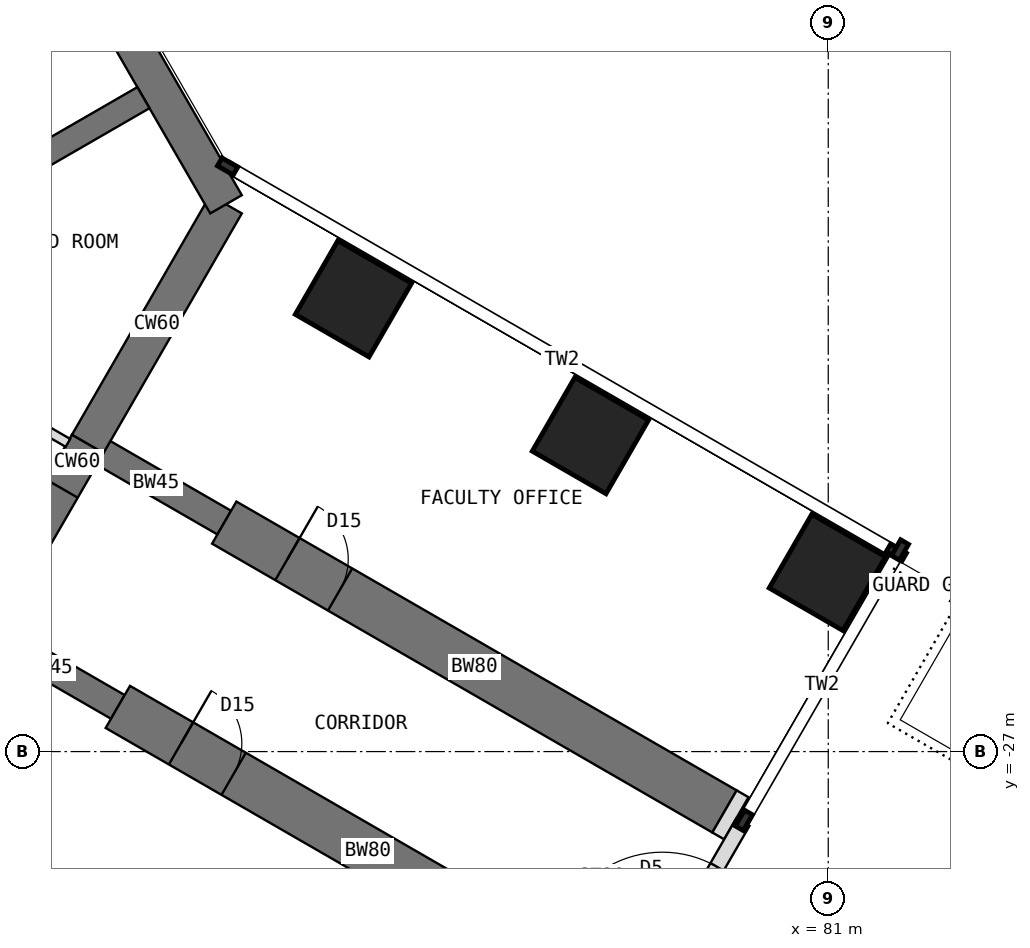
"""IFC4 building model, lengths in metres.
Left out: names, types, materials, properties, quantities, classifications, styles, units other than length and angle.
Written with IfcOpenShell. Run it as: python <this file> out.ifc"""

import sys

from ifc_helpers import new_model, si_unit, direction, frame, frame_2d, origin, origin_2d, place, context, subcontext, project, spatial, rectangle, extrude, element, fill, save


model = new_model("IFC4")
c1 = context("Model", 3, precision=1e-05, world=origin(), true_north=direction((0.0, 1.0)))
c2 = subcontext(c1, "Body", "Model", "MODEL_VIEW")
j1 = project(units=[si_unit("LENGTHUNIT", "METRE"), si_unit("PLANEANGLEUNIT", "RADIAN")], contexts=[c1])
p1 = place(None, origin())
s1 = spatial("IfcSite", under=j1, at=p1, CompositionType="ELEMENT")
p2 = place(p1, origin())
s2 = spatial("IfcBuilding", under=s1, at=p2, CompositionType="ELEMENT")
p3 = place(p2, frame((0.0, 0.0, 97.5)))
s3 = spatial("IfcBuildingStorey", under=s2, at=p3, CompositionType="ELEMENT", Elevation=97.5)
p4 = place(p3, frame((67.072, -24.97, 0.0), z_axis=(0.0, 0.0, 1.0), x_axis=(0.500010275428, 0.866019471182, 0.0)))
e1 = element("IfcWall", 1, at=p4, inside=s3, PredefinedType="SHEAR", context=c2, shape_type="SweptSolid", body=[
    extrude(rectangle(XDim=3.5, YDim=0.6, at=frame_2d((1.75, 0.0))), origin(), (0.0, 0.0, 1.0), 4.0),
])
p5 = place(p4, frame((0.85, 0.0, 0.0)))
e2 = element("IfcOpeningElement", 2, at=p5, cuts=e1, PredefinedType="OPENING", context=c2, shape_type="SweptSolid", body=[
    extrude(rectangle(XDim=1.8, YDim=2.1, at=frame_2d((0.9, 1.05))), frame((0.0, 0.31, 0.0), z_axis=(0.0, -1.0, 0.0), x_axis=(1.0, 0.0, 0.0)), (0.0, 0.0, 1.0), 0.62),
])
p6 = place(p3, frame((68.822, -21.939, 0.0), z_axis=(0.0, 0.0, 1.0), x_axis=(0.500024481964, 0.866011268655, 0.0)))
e3 = element("IfcWall", 3, at=p6, inside=s3, PredefinedType="SHEAR", context=c2, shape_type="SweptSolid", body=[
    extrude(rectangle(XDim=4.548, YDim=0.6, at=frame_2d((2.274, 0.0))), origin(), (0.0, 0.0, 1.0), 4.0),
])
p7 = place(p3, frame((71.096, -18.0, 0.0), z_axis=(0.0, 0.0, 1.0), x_axis=(-0.500005998175, 0.866021940709, 0.0)))
e4 = element("IfcWall", 4, at=p7, inside=s3, PredefinedType="SHEAR", context=c2, shape_type="SweptSolid", body=[
    extrude(rectangle(XDim=12.596, YDim=0.6, at=frame_2d((6.298, 0.0))), origin(), (0.0, 0.0, 1.0), 4.0),
])
p8 = place(p3, frame((68.822, -21.939, 0.0), z_axis=(0.0, 0.0, 1.0), x_axis=(0.866072649678, -0.499918158782, 0.0)))
e5 = element("IfcWall", 5, at=p8, inside=s3, PredefinedType="SHEAR", context=c2, shape_type="SweptSolid", body=[
    extrude(rectangle(XDim=2.592, YDim=0.45, at=frame_2d((1.296, 0.0))), origin(), (0.0, 0.0, 1.0), 4.0),
])
p9 = place(p3, frame((71.066, -23.234, 0.0), z_axis=(0.0, 0.0, 1.0), x_axis=(0.86602681393, -0.499997557548, 0.0)))
e6 = element("IfcWall", 6, at=p9, inside=s3, PredefinedType="SHEAR", context=c2, shape_type="SweptSolid", body=[
    extrude(rectangle(XDim=9.5, YDim=0.8, at=frame_2d((4.75, 0.0))), origin(), (0.0, 0.0, 1.0), 4.0),
])
p10 = place(p9, frame((1.2, 0.0, 0.0)))
e7 = element("IfcOpeningElement", 7, at=p10, cuts=e6, PredefinedType="OPENING", context=c2, shape_type="SweptSolid", body=[
    extrude(rectangle(XDim=1.0, YDim=2.1, at=frame_2d((0.5, 1.05))), frame((0.0, 0.41, 0.0), z_axis=(0.0, -1.0, 0.0), x_axis=(1.0, 0.0, 0.0)), (0.0, 0.0, 1.0), 0.82),
])
p11 = place(p3, frame((67.072, -24.97, 0.0), z_axis=(0.0, 0.0, 1.0), x_axis=(0.866031863473, -0.499988811324, 0.0)))
e8 = element("IfcWall", 8, at=p11, inside=s3, PredefinedType="SHEAR", context=c2, shape_type="SweptSolid", body=[
    extrude(rectangle(XDim=2.592, YDim=0.45, at=frame_2d((1.296, 0.0))), origin(), (0.0, 0.0, 1.0), 4.0),
])
p12 = place(p3, frame((69.316, -26.266, 0.0), z_axis=(0.0, 0.0, 1.0), x_axis=(0.86602681393, -0.499997557548, 0.0)))
e9 = element("IfcWall", 9, at=p12, inside=s3, PredefinedType="SHEAR", context=c2, shape_type="SweptSolid", body=[
    extrude(rectangle(XDim=9.5, YDim=0.8, at=frame_2d((4.75, 0.0))), origin(), (0.0, 0.0, 1.0), 4.0),
])
p13 = place(p12, frame((1.2, 0.0, 0.0)))
e10 = element("IfcOpeningElement", 10, at=p13, cuts=e9, PredefinedType="OPENING", context=c2, shape_type="SweptSolid", body=[
    extrude(rectangle(XDim=1.0, YDim=2.1, at=frame_2d((0.5, 1.05))), frame((0.0, 0.41, 0.0), z_axis=(0.0, -1.0, 0.0), x_axis=(1.0, 0.0, 0.0)), (0.0, 0.0, 1.0), 0.82),
])
for number, where, z_axis, x_axis in (
    (11, (73.191, -19.554, 0.0), (0.0, 0.0, 1.0), (0.5, 0.866, 0.0)),
    (12, (77.088, -21.804, 0.0), (0.0, 0.0, 1.0), (0.5, 0.866, 0.0)),
    (13, (80.986, -24.054, 0.0), (0.0, 0.0, 1.0), (0.5, 0.866, 0.0)),
):
    element("IfcColumn", number, at=place(p3, frame(where, z_axis=z_axis, x_axis=x_axis)), inside=s3, PredefinedType="COLUMN", context=c2, shape_type="SweptSolid", body=[
        extrude(rectangle(XDim=1.4, YDim=1.4, at=origin_2d()), origin(), (0.0, 0.0, 1.0), 4.0),
    ])
p14 = place(p3, frame((77.847, -31.19, 0.0), z_axis=(0.0, 0.0, 1.0), x_axis=(0.500010275428, 0.866019471182, 0.0)))
e14 = element("IfcWall", 14, at=p14, inside=s3, PredefinedType="STANDARD", context=c2, shape_type="SweptSolid", body=[
    extrude(rectangle(XDim=3.5, YDim=0.25, at=frame_2d((1.75, 0.0))), origin(), (0.0, 0.0, 1.0), 3.8),
])
p15 = place(p14, frame((0.85, 0.0, 0.0)))
e15 = element("IfcOpeningElement", 15, at=p15, cuts=e14, PredefinedType="OPENING", context=c2, shape_type="SweptSolid", body=[
    extrude(rectangle(XDim=1.8, YDim=2.4, at=frame_2d((0.9, 1.2))), frame((0.0, 0.135, 0.0), z_axis=(0.0, -1.0, 0.0), x_axis=(1.0, 0.0, 0.0)), (0.0, 0.0, 1.0), 0.27),
])
p16 = place(p3, frame((79.294, -27.984, 0.0), z_axis=(0.0, 0.0, 1.0), x_axis=(0.865896406789, -0.500223362819, 0.0)))
e16 = element("IfcWall", 16, at=p16, inside=s3, PredefinedType="PARTITIONING", context=c2, shape_type="SweptSolid", body=[
    extrude(rectangle(XDim=0.225, YDim=0.8, at=frame_2d((0.113, 0.0))), origin(), (0.0, 0.0, 1.0), 3.8),
])
p17 = place(p3, frame((64.62, -19.201, 0.0), z_axis=(0.0, 0.0, 1.0), x_axis=(0.866027317282, 0.49999668571, 0.0)))
e17 = element("IfcWall", 17, at=p17, inside=s3, PredefinedType="SHEAR", context=c2, shape_type="SweptSolid", body=[
    extrude(rectangle(XDim=5.908, YDim=0.4, at=frame_2d((2.954, 0.0))), origin(), (0.0, 0.0, 1.0), 4.0),
])
p18 = place(p3, frame((64.083, -19.375, 0.0), z_axis=(0.0, 0.0, 1.0), x_axis=(0.865996484538, -0.500050086259, 0.0)))
e18 = element("IfcWall", 18, at=p18, inside=s3, PredefinedType="PARTITIONING", context=c2, shape_type="SweptSolid", body=[
    extrude(rectangle(XDim=5.096, YDim=0.15, at=frame_2d((2.548, 0.0))), origin(), (0.0, 0.0, 1.0), 3.8),
])
p19 = place(p18, frame((1.043, 0.0, 0.0)))
e19 = element("IfcOpeningElement", 19, at=p19, cuts=e18, PredefinedType="OPENING", context=c2, shape_type="SweptSolid", body=[
    extrude(rectangle(XDim=1.0, YDim=2.1, at=frame_2d((0.5, 1.05))), frame((0.0, 0.085, 0.0), z_axis=(0.0, -1.0, 0.0), x_axis=(1.0, 0.0, 0.0)), (0.0, 0.0, 1.0), 0.17),
])
p20 = place(p15, origin())
e20 = element("IfcDoor", 20, at=p20, inside=s3, OperationType="DOUBLE_DOOR_DOUBLE_SWING", PredefinedType="DOOR", context=c2, shape_type="SweptSolid", body=[
    extrude(rectangle(XDim=1.8, YDim=2.4, at=frame_2d((0.9, 1.2))), frame((0.0, 0.025, 0.0), z_axis=(0.0, -1.0, 0.0), x_axis=(1.0, 0.0, 0.0)), (0.0, 0.0, 1.0), 0.05),
])
fill(e15, e20)
p21 = place(p5, origin())
e21 = element("IfcDoor", 21, at=p21, inside=s3, OperationType="DOUBLE_DOOR_DOUBLE_SWING", PredefinedType="DOOR", context=c2, shape_type="SweptSolid", body=[
    extrude(rectangle(XDim=1.72, YDim=2.06, at=frame_2d((0.9, 1.03))), frame((0.0, 0.025, 0.0), z_axis=(0.0, -1.0, 0.0), x_axis=(1.0, 0.0, 0.0)), (0.0, 0.0, 1.0), 0.05),
    extrude(rectangle(XDim=0.04, YDim=2.1, at=frame_2d((0.02, 1.05))), frame((0.0, 0.3, 0.0), z_axis=(0.0, -1.0, 0.0), x_axis=(1.0, 0.0, 0.0)), (0.0, 0.0, 1.0), 0.6),
    extrude(rectangle(XDim=0.04, YDim=2.1, at=frame_2d((1.78, 1.05))), frame((0.0, 0.3, 0.0), z_axis=(0.0, -1.0, 0.0), x_axis=(1.0, 0.0, 0.0)), (0.0, 0.0, 1.0), 0.6),
    extrude(rectangle(XDim=1.72, YDim=0.04, at=frame_2d((0.9, 2.08))), frame((0.0, 0.3, 0.0), z_axis=(0.0, -1.0, 0.0), x_axis=(1.0, 0.0, 0.0)), (0.0, 0.0, 1.0), 0.6),
])
fill(e2, e21)
p22 = place(p10, origin())
e22 = element("IfcDoor", 22, at=p22, inside=s3, OperationType="SINGLE_SWING_LEFT", PredefinedType="DOOR", context=c2, shape_type="SweptSolid", body=[
    extrude(rectangle(XDim=0.92, YDim=2.06, at=frame_2d((0.5, 1.03))), frame((0.0, 0.025, 0.0), z_axis=(0.0, -1.0, 0.0), x_axis=(1.0, 0.0, 0.0)), (0.0, 0.0, 1.0), 0.05),
    extrude(rectangle(XDim=0.04, YDim=2.1, at=frame_2d((0.02, 1.05))), frame((0.0, 0.4, 0.0), z_axis=(0.0, -1.0, 0.0), x_axis=(1.0, 0.0, 0.0)), (0.0, 0.0, 1.0), 0.8),
    extrude(rectangle(XDim=0.04, YDim=2.1, at=frame_2d((0.98, 1.05))), frame((0.0, 0.4, 0.0), z_axis=(0.0, -1.0, 0.0), x_axis=(1.0, 0.0, 0.0)), (0.0, 0.0, 1.0), 0.8),
    extrude(rectangle(XDim=0.92, YDim=0.04, at=frame_2d((0.5, 2.08))), frame((0.0, 0.4, 0.0), z_axis=(0.0, -1.0, 0.0), x_axis=(1.0, 0.0, 0.0)), (0.0, 0.0, 1.0), 0.8),
])
fill(e7, e22)
p23 = place(p13, origin())
e23 = element("IfcDoor", 23, at=p23, inside=s3, OperationType="SINGLE_SWING_LEFT", PredefinedType="DOOR", context=c2, shape_type="SweptSolid", body=[
    extrude(rectangle(XDim=0.92, YDim=2.06, at=frame_2d((0.5, 1.03))), frame((0.0, 0.025, 0.0), z_axis=(0.0, -1.0, 0.0), x_axis=(1.0, 0.0, 0.0)), (0.0, 0.0, 1.0), 0.05),
    extrude(rectangle(XDim=0.04, YDim=2.1, at=frame_2d((0.02, 1.05))), frame((0.0, 0.4, 0.0), z_axis=(0.0, -1.0, 0.0), x_axis=(1.0, 0.0, 0.0)), (0.0, 0.0, 1.0), 0.8),
    extrude(rectangle(XDim=0.04, YDim=2.1, at=frame_2d((0.98, 1.05))), frame((0.0, 0.4, 0.0), z_axis=(0.0, -1.0, 0.0), x_axis=(1.0, 0.0, 0.0)), (0.0, 0.0, 1.0), 0.8),
    extrude(rectangle(XDim=0.92, YDim=0.04, at=frame_2d((0.5, 2.08))), frame((0.0, 0.4, 0.0), z_axis=(0.0, -1.0, 0.0), x_axis=(1.0, 0.0, 0.0)), (0.0, 0.0, 1.0), 0.8),
])
fill(e10, e23)
save(model, sys.argv[1])
